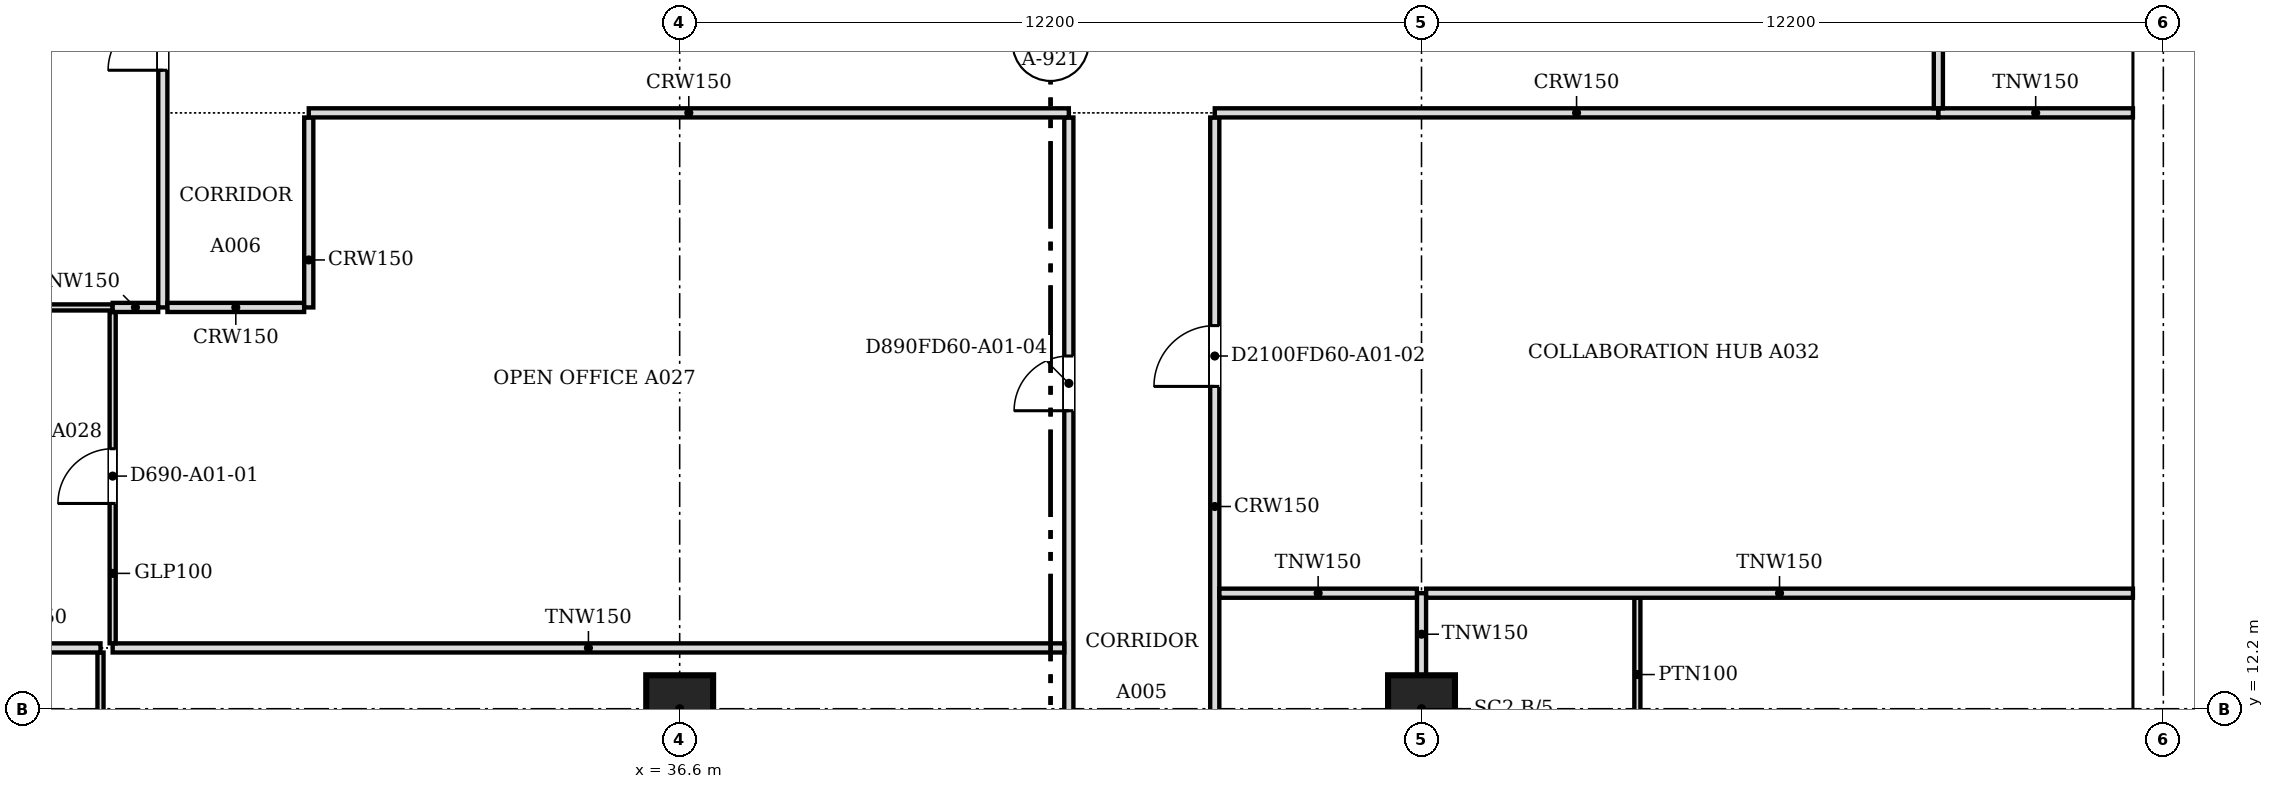
"""IFC4 building model, lengths in metres.
Left out: names, types, materials, properties, quantities, classifications, styles, units other than length and angle.
Written with IfcOpenShell. Run it as: python <this file> out.ifc"""

import sys

from ifc_helpers import new_model, si_unit, direction, frame, frame_2d, origin, origin_2d, place, context, subcontext, project, spatial, polyline, rectangle, outline, extrude, faceted_brep, source, transform, mapped, element, fill, save


model = new_model("IFC4")
c1 = context("Model", 3, precision=1e-05, world=origin(), true_north=direction((0.0, 1.0)))
c2 = subcontext(c1, "Body", "Model", "MODEL_VIEW")
j1 = project(units=[si_unit("LENGTHUNIT", "METRE"), si_unit("PLANEANGLEUNIT", "RADIAN")], contexts=[c1])
p1 = place(None, origin())
s1 = spatial("IfcSite", under=j1, at=p1, CompositionType="ELEMENT")
p2 = place(p1, origin())
s2 = spatial("IfcBuilding", under=s1, at=p2, CompositionType="ELEMENT")
p3 = place(p2, frame((0.0, 0.0, 21.3)))
s3 = spatial("IfcBuildingStorey", under=s2, at=p3, CompositionType="ELEMENT", Elevation=21.3)
for number, where, z_axis, x_axis in (
    (1, (36.6, 12.2, 0.0), (0.0, 0.0, 1.0), (1.0, 0.0, 0.0)),
    (2, (48.8, 12.2, 0.0), (0.0, 0.0, 1.0), (1.0, 0.0, 0.0)),
):
    element("IfcColumn", number, at=place(p3, frame(where, z_axis=z_axis, x_axis=x_axis)), inside=s3, PredefinedType="COLUMN", context=c2, shape_type="SweptSolid", body=[
        extrude(rectangle(XDim=1.1, YDim=1.1, at=origin_2d()), origin(), (0.0, 0.0, 1.0), 4.3),
    ])
m1 = source(origin(), c2, "Body", "SweptSolid", [
    extrude(outline(polyline([(3.05, 0.0), (6.1, 4.5), (3.05, 9.0), (0.0, 4.5), (3.05, 0.0)])), frame((0.0, 0.25, 0.0), z_axis=(0.0, -1.0, 0.0), x_axis=(1.0, 0.0, 0.0)), (0.0, 0.0, 1.0), 0.5),
])
p4 = place(p3, frame((60.75, 9.15, -4.5), z_axis=(0.0, 0.0, 1.0), x_axis=(0.0, 1.0, 0.0)))
e3 = element("IfcWall", 3, at=p4, inside=s3, PredefinedType="SOLIDWALL", context=c2, shape_type="MappedRepresentation", body=[
    mapped(m1, transform((0.0, 0.0, 0.0), scale=1.0)),
])
m2 = source(origin(), c2, "Body", "SweptSolid", [
    extrude(outline(polyline([(3.05, 0.446), (5.798, 4.5), (3.05, 8.554), (0.302, 4.5), (3.05, 0.446)])), frame((0.0, 0.26, 0.0), z_axis=(0.0, -1.0, 0.0), x_axis=(1.0, 0.0, 0.0)), (0.0, 0.0, 1.0), 0.52),
])
p5 = place(p4, origin())
e4 = element("IfcOpeningElement", 4, at=p5, cuts=e3, PredefinedType="OPENING", context=c2, shape_type="MappedRepresentation", body=[
    mapped(m2, transform((0.0, 0.0, 0.0), scale=1.0)),
])
p6 = place(p3, frame((60.75, 15.25, -4.5), z_axis=(0.0, 0.0, 1.0), x_axis=(0.0, 1.0, 0.0)))
e5 = element("IfcWall", 5, at=p6, inside=s3, PredefinedType="SOLIDWALL", context=c2, shape_type="MappedRepresentation", body=[
    mapped(m1, transform((0.0, 0.0, 0.0), scale=1.0)),
])
p7 = place(p6, origin())
e6 = element("IfcOpeningElement", 6, at=p7, cuts=e5, PredefinedType="OPENING", context=c2, shape_type="MappedRepresentation", body=[
    mapped(m2, transform((0.0, 0.0, 0.0), scale=1.0)),
])
m3 = source(origin(), c2, "Body", "Brep", [
    faceted_brep([(3.05, -0.25, 0.0), (6.1, -0.25, 4.5), (6.1, -0.25, 4.5), (3.05, -0.25, 9.0), (0.0, -0.25, 4.5), (0.0, 0.25, 4.5), (3.05, 0.25, 9.0), (6.1, 0.25, 4.5), (6.1, 0.25, 4.5), (3.05, 0.25, 0.0)], [[[0, 1, 2, 3, 4]], [[5, 6, 7, 8, 9]], [[9, 8, 1, 0]], [[7, 6, 3, 2]], [[6, 5, 4, 3]], [[5, 9, 0, 4]], [[1, 8, 7, 2]]]),
])
p8 = place(p3, frame((60.75, 21.35, -4.5), z_axis=(0.0, 0.0, 1.0), x_axis=(0.0, 1.0, 0.0)))
e7 = element("IfcWall", 7, at=p8, inside=s3, PredefinedType="SOLIDWALL", context=c2, shape_type="MappedRepresentation", body=[
    mapped(m3, transform((0.0, 0.0, 0.0), scale=1.0)),
])
p9 = place(p8, origin())
e8 = element("IfcOpeningElement", 8, at=p9, cuts=e7, PredefinedType="OPENING", context=c2, shape_type="MappedRepresentation", body=[
    mapped(m2, transform((0.0, 0.0, 0.0), scale=1.0)),
])
m4 = source(origin(), c2, "Body", "SweptSolid", [
    extrude(outline(polyline([(3.05, 0.0), (6.1, 4.5), (0.0, 4.5), (3.05, 0.0)])), frame((0.0, 0.25, 0.0), z_axis=(0.0, -1.0, 0.0), x_axis=(1.0, 0.0, 0.0)), (0.0, 0.0, 1.0), 0.5),
])
p10 = place(p3, frame((60.75, 12.2, 0.0), z_axis=(0.0, 0.0, 1.0), x_axis=(0.0, 1.0, 0.0)))
e9 = element("IfcWall", 9, at=p10, inside=s3, PredefinedType="SOLIDWALL", context=c2, shape_type="MappedRepresentation", body=[
    mapped(m4, transform((0.0, 0.0, 0.0), scale=1.0)),
])
m5 = source(origin(), c2, "Body", "SweptSolid", [
    extrude(outline(polyline([(3.05, 0.446), (5.629, 4.25), (0.471, 4.25), (3.05, 0.446)])), frame((0.0, 0.26, 0.0), z_axis=(0.0, -1.0, 0.0), x_axis=(1.0, 0.0, 0.0)), (0.0, 0.0, 1.0), 0.52),
])
p11 = place(p10, origin())
e10 = element("IfcOpeningElement", 10, at=p11, cuts=e9, PredefinedType="OPENING", context=c2, shape_type="MappedRepresentation", body=[
    mapped(m5, transform((0.0, 0.0, 0.0), scale=1.0)),
])
m6 = source(origin(), c2, "Body", "Brep", [
    faceted_brep([(3.05, -0.25, 0.0), (6.1, -0.25, 4.5), (6.1, -0.25, 4.5), (0.0, -0.25, 4.5), (0.0, 0.25, 4.5), (6.1, 0.25, 4.5), (6.1, 0.25, 4.5), (3.05, 0.25, 0.0)], [[[0, 1, 2, 3]], [[4, 5, 6, 7]], [[7, 6, 1, 0]], [[5, 4, 3, 2]], [[4, 7, 0, 3]], [[1, 6, 5, 2]]]),
])
p12 = place(p3, frame((60.75, 18.3, 0.0), z_axis=(0.0, 0.0, 1.0), x_axis=(0.0, 1.0, 0.0)))
e11 = element("IfcWall", 11, at=p12, inside=s3, PredefinedType="SOLIDWALL", context=c2, shape_type="MappedRepresentation", body=[
    mapped(m6, transform((0.0, 0.0, 0.0), scale=1.0)),
])
p13 = place(p12, origin())
e12 = element("IfcOpeningElement", 12, at=p13, cuts=e11, PredefinedType="OPENING", context=c2, shape_type="MappedRepresentation", body=[
    mapped(m5, transform((0.0, 0.0, 0.0), scale=1.0)),
])
p14 = place(p3, frame((43.0, 0.5, 0.0), z_axis=(0.0, 0.0, 1.0), x_axis=(0.0, 1.0, 0.0)))
e13 = element("IfcWall", 13, at=p14, inside=s3, PredefinedType="PARTITIONING", context=c2, shape_type="SweptSolid", body=[
    extrude(rectangle(XDim=21.424, YDim=0.15, at=frame_2d((10.712, 0.0))), origin(), (0.0, 0.0, 1.0), 3.767),
])
m7 = source(origin(), c2, "Body", "SweptSolid", [
    extrude(rectangle(XDim=0.9, YDim=2.1, at=frame_2d((0.45, 1.05))), frame((0.0, 0.085, 0.0), z_axis=(0.0, -1.0, 0.0), x_axis=(1.0, 0.0, 0.0)), (0.0, 0.0, 1.0), 0.17),
])
p15 = place(p14, frame((16.601, 0.0, 0.0)))
e14 = element("IfcOpeningElement", 14, at=p15, cuts=e13, PredefinedType="OPENING", context=c2, shape_type="MappedRepresentation", body=[
    mapped(m7, transform((0.0, 0.0, 0.0), scale=1.0)),
])
m8 = source(origin(), c2, "Body", "SweptSolid", [
    extrude(rectangle(XDim=1.0, YDim=2.1, at=frame_2d((0.5, 1.05))), frame((0.0, 0.085, 0.0), z_axis=(0.0, -1.0, 0.0), x_axis=(1.0, 0.0, 0.0)), (0.0, 0.0, 1.0), 0.17),
])
p16 = place(p14, frame((7.7, 0.0, 0.0)))
e15 = element("IfcOpeningElement", 15, at=p16, cuts=e13, PredefinedType="OPENING", context=c2, shape_type="MappedRepresentation", body=[
    mapped(m8, transform((0.0, 0.0, 0.0), scale=1.0)),
])
p17 = place(p3, frame((27.075, 4.2, 0.0), z_axis=(0.0, 0.0, 1.0), x_axis=(0.0, 1.0, 0.0)))
e16 = element("IfcWall", 16, at=p17, inside=s3, PredefinedType="PARTITIONING", context=c2, shape_type="SweptSolid", body=[
    extrude(rectangle(XDim=8.924, YDim=0.1, at=frame_2d((4.462, 0.0))), origin(), (0.0, 0.0, 1.0), 3.767),
])
m9 = source(origin(), c2, "Body", "SweptSolid", [
    extrude(rectangle(XDim=0.9, YDim=2.1, at=frame_2d((0.45, 1.05))), frame((0.0, 0.06, 0.0), z_axis=(0.0, -1.0, 0.0), x_axis=(1.0, 0.0, 0.0)), (0.0, 0.0, 1.0), 0.12),
])
p18 = place(p17, frame((4.0, 0.0, 0.0)))
e17 = element("IfcOpeningElement", 17, at=p18, cuts=e16, PredefinedType="OPENING", context=c2, shape_type="MappedRepresentation", body=[
    mapped(m9, transform((0.0, 0.0, 0.0), scale=1.0)),
])
p19 = place(p3, frame((45.4, 21.924, 0.0), z_axis=(0.0, 0.0, 1.0), x_axis=(0.0, -1.0, 0.0)))
e18 = element("IfcWall", 18, at=p19, inside=s3, PredefinedType="PARTITIONING", context=c2, shape_type="SweptSolid", body=[
    extrude(rectangle(XDim=17.724, YDim=0.15, at=frame_2d((8.862, 0.0))), origin(), (0.0, 0.0, 1.0), 3.767),
])
p20 = place(p19, frame((3.423, 0.0, 0.0)))
e19 = element("IfcOpeningElement", 19, at=p20, cuts=e18, PredefinedType="OPENING", context=c2, shape_type="MappedRepresentation", body=[
    mapped(m8, transform((0.0, 0.0, 0.0), scale=1.0)),
])
p21 = place(p19, frame((12.324, 0.0, 0.0)))
e20 = element("IfcOpeningElement", 20, at=p21, cuts=e18, PredefinedType="OPENING", context=c2, shape_type="MappedRepresentation", body=[
    mapped(m8, transform((0.0, 0.0, 0.0), scale=1.0)),
])
p22 = place(p3, frame((52.35, 14.024, 0.0), z_axis=(0.0, 0.0, 1.0), x_axis=(0.0, -1.0, 0.0)))
e21 = element("IfcWall", 21, at=p22, inside=s3, PredefinedType="PARTITIONING", context=c2, shape_type="SweptSolid", body=[
    extrude(rectangle(XDim=5.924, YDim=0.1, at=frame_2d((2.962, 0.0))), origin(), (0.0, 0.0, 1.0), 3.767),
])
p23 = place(p22, frame((2.524, 0.0, 0.0)))
e22 = element("IfcOpeningElement", 22, at=p23, cuts=e21, PredefinedType="OPENING", context=c2, shape_type="MappedRepresentation", body=[
    mapped(m9, transform((0.0, 0.0, 0.0), scale=1.0)),
])
p24 = place(p3, frame((48.8, 12.751, 0.0), z_axis=(0.0, 0.0, 1.0), x_axis=(0.0, 1.0, 0.0)))
e23 = element("IfcWall", 23, at=p24, inside=s3, PredefinedType="PARTITIONING", context=c2, shape_type="SweptSolid", body=[
    extrude(rectangle(XDim=1.349, YDim=0.15, at=frame_2d((0.675, 0.0))), origin(), (0.0, 0.0, 1.0), 3.767),
])
p25 = place(p3, frame((24.55, 13.2, 0.0), z_axis=(0.0, 0.0, 1.0), x_axis=(1.0, 0.0, 0.0)))
e24 = element("IfcWall", 24, at=p25, inside=s3, PredefinedType="PARTITIONING", context=c2, shape_type="SweptSolid", body=[
    extrude(rectangle(XDim=2.525, YDim=0.15, at=frame_2d((1.262, 0.0))), origin(), (0.0, 0.0, 1.0), 3.767),
])
p26 = place(p3, frame((27.275, 13.2, 0.0), z_axis=(0.0, 0.0, 1.0), x_axis=(1.0, 0.0, 0.0)))
e25 = element("IfcWall", 25, at=p26, inside=s3, PredefinedType="PARTITIONING", context=c2, shape_type="SweptSolid", body=[
    extrude(rectangle(XDim=15.649, YDim=0.15, at=frame_2d((7.825, 0.0))), origin(), (0.0, 0.0, 1.0), 3.767),
])
p27 = place(p3, frame((27.275, 13.276, 0.0), z_axis=(0.0, 0.0, 1.0), x_axis=(0.0, 1.0, 0.0)))
e26 = element("IfcWall", 26, at=p27, inside=s3, PredefinedType="PARTITIONING", context=c2, shape_type="SweptSolid", body=[
    extrude(rectangle(XDim=5.448, YDim=0.1, at=frame_2d((2.724, 0.0))), origin(), (0.0, 0.0, 1.0), 3.767),
])
p28 = place(p27, frame((2.3, 0.0, 0.0)))
e27 = element("IfcOpeningElement", 27, at=p28, cuts=e26, PredefinedType="OPENING", context=c2, shape_type="MappedRepresentation", body=[
    mapped(m9, transform((0.0, 0.0, 0.0), scale=1.0)),
])
p29 = place(p3, frame((45.476, 14.1, 0.0), z_axis=(0.0, 0.0, 1.0), x_axis=(1.0, 0.0, 0.0)))
e28 = element("IfcWall", 28, at=p29, inside=s3, PredefinedType="PARTITIONING", context=c2, shape_type="SweptSolid", body=[
    extrude(rectangle(XDim=3.248, YDim=0.15, at=frame_2d((1.624, 0.0))), origin(), (0.0, 0.0, 1.0), 3.767),
])
p30 = place(p3, frame((48.876, 14.1, 0.0), z_axis=(0.0, 0.0, 1.0), x_axis=(1.0, 0.0, 0.0)))
e29 = element("IfcWall", 29, at=p30, inside=s3, PredefinedType="PARTITIONING", context=c2, shape_type="SweptSolid", body=[
    extrude(rectangle(XDim=11.624, YDim=0.15, at=frame_2d((5.812, 0.0))), origin(), (0.0, 0.0, 1.0), 3.767),
])
p31 = place(p3, frame((22.0, 18.8, 0.0), z_axis=(0.0, 0.0, 1.0), x_axis=(1.0, 0.0, 0.0)))
e30 = element("IfcWall", 30, at=p31, inside=s3, PredefinedType="PARTITIONING", context=c2, shape_type="SweptSolid", body=[
    extrude(rectangle(XDim=5.274, YDim=0.1, at=frame_2d((2.637, 0.0))), origin(), (0.0, 0.0, 1.0), 3.767),
])
p32 = place(p3, frame((27.275, 18.8, 0.0), z_axis=(0.0, 0.0, 1.0), x_axis=(1.0, 0.0, 0.0)))
e31 = element("IfcWall", 31, at=p32, inside=s3, PredefinedType="PARTITIONING", context=c2, shape_type="SweptSolid", body=[
    extrude(rectangle(XDim=0.749, YDim=0.15, at=frame_2d((0.375, 0.0))), origin(), (0.0, 0.0, 1.0), 3.767),
])
p33 = place(p3, frame((28.1, 18.8, 0.0), z_axis=(0.0, 0.0, 1.0), x_axis=(0.0, 1.0, 0.0)))
e32 = element("IfcWall", 32, at=p33, inside=s3, PredefinedType="PARTITIONING", context=c2, shape_type="SweptSolid", body=[
    extrude(rectangle(XDim=26.424, YDim=0.15, at=frame_2d((13.212, 0.0))), origin(), (0.0, 0.0, 1.0), 3.767),
])
p34 = place(p33, frame((3.901, 0.0, 0.0)))
e33 = element("IfcOpeningElement", 33, at=p34, cuts=e32, PredefinedType="OPENING", context=c2, shape_type="MappedRepresentation", body=[
    mapped(m7, transform((0.0, 0.0, 0.0), scale=1.0)),
])
p35 = place(p33, frame((23.451, 0.0, 0.0)))
e34 = element("IfcOpeningElement", 34, at=p35, cuts=e32, PredefinedType="OPENING", context=c2, shape_type="MappedRepresentation", body=[
    mapped(m7, transform((0.0, 0.0, 0.0), scale=1.0)),
])
p36 = place(p33, frame((8.4, 0.0, 0.0)))
e35 = element("IfcOpeningElement", 35, at=p36, cuts=e32, PredefinedType="OPENING", context=c2, shape_type="MappedRepresentation", body=[
    mapped(m8, transform((0.0, 0.0, 0.0), scale=1.0)),
])
p37 = place(p33, frame((16.3, 0.0, 0.0)))
e36 = element("IfcOpeningElement", 36, at=p37, cuts=e32, PredefinedType="OPENING", context=c2, shape_type="MappedRepresentation", body=[
    mapped(m7, transform((0.0, 0.0, 0.0), scale=1.0)),
])
p38 = place(p3, frame((28.176, 18.8, 0.0), z_axis=(0.0, 0.0, 1.0), x_axis=(1.0, 0.0, 0.0)))
e37 = element("IfcWall", 37, at=p38, inside=s3, PredefinedType="PARTITIONING", context=c2, shape_type="SweptSolid", body=[
    extrude(rectangle(XDim=2.248, YDim=0.15, at=frame_2d((1.124, 0.0))), origin(), (0.0, 0.0, 1.0), 3.767),
])
p39 = place(p3, frame((30.5, 18.8, 0.0), z_axis=(0.0, 0.0, 1.0), x_axis=(0.0, 1.0, 0.0)))
e38 = element("IfcWall", 38, at=p39, inside=s3, PredefinedType="PARTITIONING", context=c2, shape_type="SweptSolid", body=[
    extrude(rectangle(XDim=3.124, YDim=0.15, at=frame_2d((1.562, 0.0))), origin(), (0.0, 0.0, 1.0), 3.767),
])
p40 = place(p3, frame((30.5, 22.0, 0.0), z_axis=(0.0, 0.0, 1.0), x_axis=(1.0, 0.0, 0.0)))
e39 = element("IfcWall", 39, at=p40, inside=s3, PredefinedType="PARTITIONING", context=c2, shape_type="SweptSolid", body=[
    extrude(rectangle(XDim=12.5, YDim=0.15, at=frame_2d((6.25, 0.0))), origin(), (0.0, 0.0, 1.0), 3.767),
])
p41 = place(p3, frame((45.4, 22.0, 0.0), z_axis=(0.0, 0.0, 1.0), x_axis=(1.0, 0.0, 0.0)))
e40 = element("IfcWall", 40, at=p41, inside=s3, PredefinedType="PARTITIONING", context=c2, shape_type="SweptSolid", body=[
    extrude(rectangle(XDim=11.9, YDim=0.15, at=frame_2d((5.95, 0.0))), origin(), (0.0, 0.0, 1.0), 3.767),
])
p42 = place(p3, frame((57.301, 22.0, 0.0), z_axis=(0.0, 0.0, 1.0), x_axis=(1.0, 0.0, 0.0)))
e41 = element("IfcWall", 41, at=p42, inside=s3, PredefinedType="PARTITIONING", context=c2, shape_type="SweptSolid", body=[
    extrude(rectangle(XDim=3.199, YDim=0.15, at=frame_2d((1.6, 0.0))), origin(), (0.0, 0.0, 1.0), 3.767),
])
p43 = place(p3, frame((57.3, 30.6, 0.0), z_axis=(0.0, 0.0, 1.0), x_axis=(0.0, -1.0, 0.0)))
e42 = element("IfcWall", 42, at=p43, inside=s3, PredefinedType="PARTITIONING", context=c2, shape_type="SweptSolid", body=[
    extrude(rectangle(XDim=8.524, YDim=0.15, at=frame_2d((4.262, 0.0))), origin(), (0.0, 0.0, 1.0), 3.767),
])
p44 = place(p43, frame((3.824, 0.0, 0.0)))
e43 = element("IfcOpeningElement", 43, at=p44, cuts=e42, PredefinedType="OPENING", context=c2, shape_type="MappedRepresentation", body=[
    mapped(m7, transform((0.0, 0.0, 0.0), scale=1.0)),
])
m10 = source(origin(), c2, "Body", "SweptSolid", [
    extrude(rectangle(XDim=0.9, YDim=2.1, at=frame_2d((0.45, 1.05))), frame((0.0, 0.025, 0.0), z_axis=(0.0, -1.0, 0.0), x_axis=(1.0, 0.0, 0.0)), (0.0, 0.0, 1.0), 0.05),
])
p45 = place(p34, origin())
e44 = element("IfcDoor", 44, at=p45, inside=s3, OperationType="SINGLE_SWING_LEFT", PredefinedType="DOOR", context=c2, shape_type="MappedRepresentation", body=[
    mapped(m10, transform((0.0, 0.0, 0.0), scale=1.0)),
])
fill(e33, e44)
p46 = place(p28, origin())
e45 = element("IfcDoor", 45, at=p46, inside=s3, OperationType="SINGLE_SWING_LEFT", PredefinedType="DOOR", context=c2, shape_type="MappedRepresentation", body=[
    mapped(m10, transform((0.0, 0.0, 0.0), scale=1.0)),
])
fill(e27, e45)
m11 = source(origin(), c2, "Body", "SweptSolid", [
    extrude(rectangle(XDim=1.0, YDim=2.1, at=frame_2d((0.5, 1.05))), frame((0.0, 0.025, 0.0), z_axis=(0.0, -1.0, 0.0), x_axis=(1.0, 0.0, 0.0)), (0.0, 0.0, 1.0), 0.05),
])
p47 = place(p20, origin())
e46 = element("IfcDoor", 46, at=p47, inside=s3, OperationType="SINGLE_SWING_RIGHT", PredefinedType="DOOR", context=c2, shape_type="MappedRepresentation", body=[
    mapped(m11, transform((0.0, 0.0, 0.0), scale=1.0)),
])
fill(e19, e46)
p48 = place(p15, origin())
e47 = element("IfcDoor", 47, at=p48, inside=s3, OperationType="SINGLE_SWING_LEFT", PredefinedType="DOOR", context=c2, shape_type="MappedRepresentation", body=[
    mapped(m10, transform((0.0, 0.0, 0.0), scale=1.0)),
])
fill(e14, e47)
save(model, sys.argv[1])
